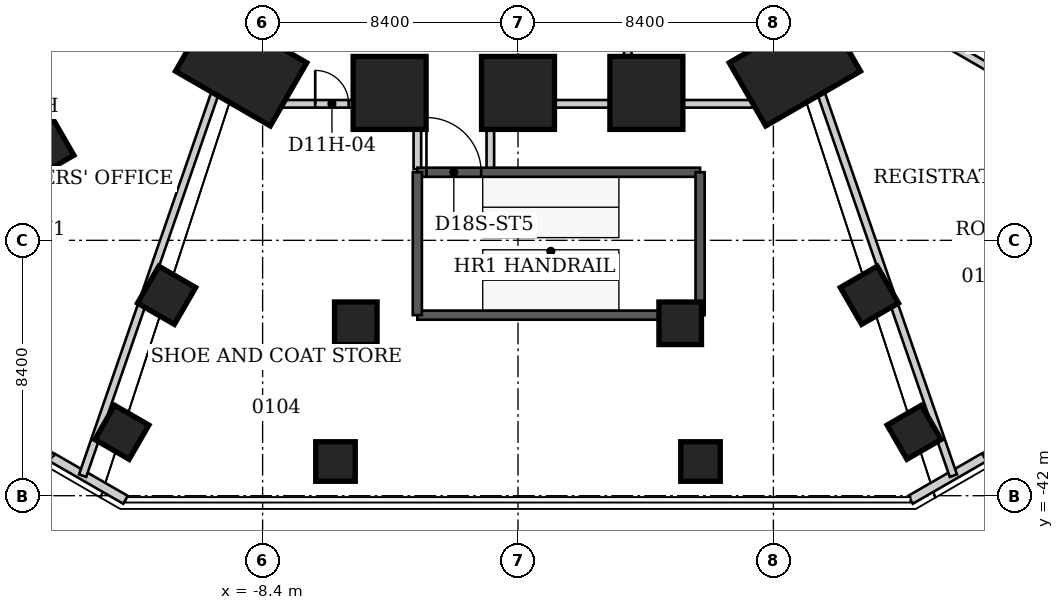
"""IFC4 building model, lengths in metres.
Left out: names, types, materials, properties, quantities, classifications, styles, units other than length and angle.
Written with IfcOpenShell. Run it as: python <this file> out.ifc"""

import sys

from ifc_helpers import new_model, si_unit, direction, frame, frame_2d, origin, origin_2d, place, context, subcontext, project, spatial, rectangle, extrude, element, fill, save


model = new_model("IFC4")
c1 = context("Model", 3, precision=1e-05, world=origin(), true_north=direction((0.0, 1.0)))
c2 = subcontext(c1, "Body", "Model", "MODEL_VIEW")
j1 = project(units=[si_unit("LENGTHUNIT", "METRE"), si_unit("PLANEANGLEUNIT", "RADIAN")], contexts=[c1])
p1 = place(None, origin())
s1 = spatial("IfcSite", under=j1, at=p1, CompositionType="ELEMENT")
p2 = place(p1, origin())
s2 = spatial("IfcBuilding", under=s1, at=p2, CompositionType="ELEMENT")
p3 = place(p2, frame((0.0, 0.0, 6.0)))
s3 = spatial("IfcBuildingStorey", under=s2, at=p3, CompositionType="ELEMENT", Elevation=6.0)
p4 = place(p3, frame((9.106, -27.897, 0.0), z_axis=(0.0, 0.0, 1.0), x_axis=(0.5, -0.866025403784, 0.0)))
e1 = element("IfcColumn", 1, at=p4, inside=s3, PredefinedType="COLUMN", context=c2, shape_type="SweptSolid", body=[
    extrude(rectangle(XDim=2.4, YDim=3.6, at=origin_2d()), origin(), (0.0, 0.0, 1.0), 6.0),
])
for number, where, z_axis, x_axis in (
    (2, (4.222, -28.751, 0.0), (0.0, 0.0, 1.0), (0.0, -1.0, 0.0)),
    (3, (0.0, -28.751, 0.0), (0.0, 0.0, 1.0), (0.0, -1.0, 0.0)),
    (4, (-4.222, -28.751, 0.0), (0.0, 0.0, 1.0), (0.0, -1.0, 0.0)),
):
    element("IfcColumn", number, at=place(p3, frame(where, z_axis=z_axis, x_axis=x_axis)), inside=s3, PredefinedType="COLUMN", context=c2, shape_type="SweptSolid", body=[
        extrude(rectangle(XDim=2.4, YDim=2.4, at=origin_2d()), origin(), (0.0, 0.0, 1.0), 6.0),
    ])
p5 = place(p3, frame((-9.106, -27.897, 0.0), z_axis=(0.0, 0.0, 1.0), x_axis=(-0.5, -0.866025403784, 0.0)))
e5 = element("IfcColumn", 5, at=p5, inside=s3, PredefinedType="COLUMN", context=c2, shape_type="SweptSolid", body=[
    extrude(rectangle(XDim=2.4, YDim=3.6, at=origin_2d()), origin(), (0.0, 0.0, 1.0), 6.0),
])
for number, where, z_axis, x_axis in (
    (6, (11.558, -35.408, 0.0), (0.0, 0.0, 1.0), (0.5, -0.866, 0.0)),
    (7, (5.335, -36.329, 0.0), (0.0, 0.0, 1.0), (0.0, -1.0, 0.0)),
    (8, (-5.335, -36.329, 0.0), (0.0, 0.0, 1.0), (0.0, -1.0, 0.0)),
    (9, (-11.558, -35.408, 0.0), (0.0, 0.0, 1.0), (-0.5, -0.866, 0.0)),
    (10, (-15.563, -30.546, 0.0), (0.0, 0.0, 1.0), (-0.866, -0.5, 0.0)),
):
    element("IfcColumn", number, at=place(p3, frame(where, z_axis=z_axis, x_axis=x_axis)), inside=s3, PredefinedType="COLUMN", context=c2, shape_type="SweptSolid", body=[
        extrude(rectangle(XDim=1.4, YDim=1.4, at=origin_2d()), origin(), (0.0, 0.0, 1.0), 6.0),
    ])
for number, where, z_axis, x_axis in (
    (11, (13.029, -39.915, 0.0), (0.0, 0.0, 1.0), (0.5, -0.866, 0.0)),
    (12, (6.003, -40.875, 0.0), (0.0, 0.0, 1.0), (0.0, -1.0, 0.0)),
    (13, (-6.003, -40.875, 0.0), (0.0, 0.0, 1.0), (0.0, -1.0, 0.0)),
    (14, (-13.029, -39.915, 0.0), (0.0, 0.0, 1.0), (-0.5, -0.866, 0.0)),
):
    element("IfcColumn", number, at=place(p3, frame(where, z_axis=z_axis, x_axis=x_axis)), inside=s3, PredefinedType="COLUMN", context=c2, shape_type="SweptSolid", body=[
        extrude(rectangle(XDim=1.3, YDim=1.3, at=origin_2d()), origin(), (0.0, 0.0, 1.0), 6.0),
    ])
for number, where, z_axis, x_axis in (
    (15, (15.335, -40.735, 0.0), (0.0, 0.0, 1.0), (-0.866, -0.5, 0.0)),
    (16, (-12.91, -42.135, 0.0), (0.0, 0.0, 1.0), (-0.866, 0.5, 0.0)),
):
    element("IfcWall", number, at=place(p3, frame(where, z_axis=z_axis, x_axis=x_axis)), inside=s3, PredefinedType="SOLIDWALL", context=c2, shape_type="SweptSolid", body=[
        extrude(rectangle(XDim=2.8, YDim=0.3, at=frame_2d((1.4, 0.0))), origin(), (0.0, 0.0, 1.0), 5.84),
    ])
p6 = place(p3, frame((-21.234, -30.465, 0.0), z_axis=(0.0, 0.0, 1.0), x_axis=(0.866022886878, 0.500004359385, 0.0)))
e17 = element("IfcWall", 17, at=p6, inside=s3, PredefinedType="PARTITIONING", context=c2, shape_type="SweptSolid", body=[
    extrude(rectangle(XDim=10.57, YDim=0.25, at=frame_2d((5.285, 0.0))), origin(), (0.0, 0.0, 1.0), 5.75),
])
p7 = place(p6, frame((4.485, 0.0, 0.0)))
e18 = element("IfcOpeningElement", 18, at=p7, cuts=e17, PredefinedType="OPENING", context=c2, shape_type="SweptSolid", body=[
    extrude(rectangle(XDim=1.6, YDim=2.4, at=frame_2d((0.8, 1.2))), frame((0.0, 0.125, 0.0), z_axis=(0.0, -1.0, 0.0), x_axis=(1.0, 0.0, 0.0)), (0.0, 0.0, 1.0), 0.25),
])
p8 = place(p3, frame((-14.32, -41.342, 0.0), z_axis=(0.0, 0.0, 1.0), x_axis=(0.326937002365, 0.94504613458, 0.0)))
e19 = element("IfcWall", 19, at=p8, inside=s3, PredefinedType="PARTITIONING", context=c2, shape_type="SweptSolid", body=[
    extrude(rectangle(XDim=13.673, YDim=0.25, at=frame_2d((6.836, 0.0))), origin(), (0.0, 0.0, 1.0), 5.75),
])
p9 = place(p3, frame((-10.38, -28.11, 0.0), z_axis=(0.0, 0.0, 1.0), x_axis=(-0.500502105275, 0.86573531903, 0.0)))
e20 = element("IfcWall", 20, at=p9, inside=s3, PredefinedType="PARTITIONING", context=c2, shape_type="SweptSolid", body=[
    extrude(rectangle(XDim=3.388, YDim=0.25, at=frame_2d((1.694, 0.0))), origin(), (0.0, 0.0, 1.0), 5.84),
])
p10 = place(p3, frame((-10.38, -28.11, 0.0), z_axis=(0.0, 0.0, 1.0), x_axis=(0.865714845822, -0.5005375168, 0.0)))
e21 = element("IfcWall", 21, at=p10, inside=s3, PredefinedType="PARTITIONING", context=c2, shape_type="SweptSolid", body=[
    extrude(rectangle(XDim=0.579, YDim=0.25, at=frame_2d((0.29, 0.0))), origin(), (0.0, 0.0, 1.0), 5.84),
])
p11 = place(p3, frame((-8.65, -29.11, 0.0), z_axis=(0.0, 0.0, 1.0), x_axis=(-0.866883441829, 0.498510880807, 0.0)))
e22 = element("IfcWall", 22, at=p11, inside=s3, PredefinedType="PARTITIONING", context=c2, shape_type="SweptSolid", body=[
    extrude(rectangle(XDim=1.385, YDim=0.25, at=frame_2d((0.692, 0.0))), origin(), (0.0, 0.0, 1.0), 5.84),
])
p12 = place(p3, frame((-8.65, -29.11, 0.0), z_axis=(0.0, 0.0, 1.0), x_axis=(1.0, 0.0, 0.0)))
e23 = element("IfcWall", 23, at=p12, inside=s3, PredefinedType="PARTITIONING", context=c2, shape_type="SweptSolid", body=[
    extrude(rectangle(XDim=0.82, YDim=0.25, at=frame_2d((0.41, 0.0))), origin(), (0.0, 0.0, 1.0), 5.84),
])
p13 = place(p3, frame((-7.83, -29.11, 0.0), z_axis=(0.0, 0.0, 1.0), x_axis=(0.0, 1.0, 0.0)))
e24 = element("IfcWall", 24, at=p13, inside=s3, PredefinedType="PARTITIONING", context=c2, shape_type="SweptSolid", body=[
    extrude(rectangle(XDim=2.4, YDim=0.25, at=frame_2d((1.2, 0.0))), origin(), (0.0, 0.0, 1.0), 5.84),
])
p14 = place(p3, frame((-7.83, -29.11, 0.0), z_axis=(0.0, 0.0, 1.0), x_axis=(1.0, 0.0, 0.0)))
e25 = element("IfcWall", 25, at=p14, inside=s3, PredefinedType="PARTITIONING", context=c2, shape_type="SweptSolid", body=[
    extrude(rectangle(XDim=4.52, YDim=0.25, at=frame_2d((2.26, 0.0))), origin(), (0.0, 0.0, 1.0), 4.04),
])
p15 = place(p14, frame((1.16, 0.0, 0.0)))
e26 = element("IfcOpeningElement", 26, at=p15, cuts=e25, PredefinedType="OPENING", context=c2, shape_type="SweptSolid", body=[
    extrude(rectangle(XDim=1.1, YDim=2.2, at=frame_2d((0.55, 1.1))), frame((0.0, 0.125, 0.0), z_axis=(0.0, -1.0, 0.0), x_axis=(1.0, 0.0, 0.0)), (0.0, 0.0, 1.0), 0.25),
])
for number, where, z_axis, x_axis in (
    (27, (-3.31, -29.11, 0.0), (0.0, 0.0, 1.0), (0.0, -1.0, 0.0)),
    (28, (-0.91, -31.26, 0.0), (0.0, 0.0, 1.0), (0.0, 1.0, 0.0)),
):
    element("IfcWall", number, at=place(p3, frame(where, z_axis=z_axis, x_axis=x_axis)), inside=s3, PredefinedType="PARTITIONING", context=c2, shape_type="SweptSolid", body=[
        extrude(rectangle(XDim=2.15, YDim=0.25, at=frame_2d((1.075, 0.0))), origin(), (0.0, 0.0, 1.0), 5.84),
    ])
p16 = place(p3, frame((-0.91, -29.11, 0.0), z_axis=(0.0, 0.0, 1.0), x_axis=(1.0, 0.0, 0.0)))
e29 = element("IfcWall", 29, at=p16, inside=s3, PredefinedType="PARTITIONING", context=c2, shape_type="SweptSolid", body=[
    extrude(rectangle(XDim=4.52, YDim=0.25, at=frame_2d((2.26, 0.0))), origin(), (0.0, 0.0, 1.0), 4.04),
])
p17 = place(p3, frame((3.61, -29.11, 0.0), z_axis=(0.0, 0.0, 1.0), x_axis=(1.0, 0.0, 0.0)))
e30 = element("IfcWall", 30, at=p17, inside=s3, PredefinedType="PARTITIONING", context=c2, shape_type="SweptSolid", body=[
    extrude(rectangle(XDim=5.04, YDim=0.25, at=frame_2d((2.52, 0.0))), origin(), (0.0, 0.0, 1.0), 4.04),
])
p18 = place(p3, frame((3.61, -26.71, 0.0), z_axis=(0.0, 0.0, 1.0), x_axis=(0.0, -1.0, 0.0)))
e31 = element("IfcWall", 31, at=p18, inside=s3, PredefinedType="PARTITIONING", context=c2, shape_type="SweptSolid", body=[
    extrude(rectangle(XDim=2.4, YDim=0.25, at=frame_2d((1.2, 0.0))), origin(), (0.0, 0.0, 1.0), 5.84),
])
p19 = place(p3, frame((8.65, -29.11, 0.0), z_axis=(0.0, 0.0, 1.0), x_axis=(0.865736025111, 0.500500883941, 0.0)))
e32 = element("IfcWall", 32, at=p19, inside=s3, PredefinedType="PARTITIONING", context=c2, shape_type="SweptSolid", body=[
    extrude(rectangle(XDim=1.384, YDim=0.25, at=frame_2d((0.692, 0.0))), origin(), (0.0, 0.0, 1.0), 5.84),
])
p20 = place(p3, frame((8.69, -26.21, 0.0), z_axis=(0.0, 0.0, 1.0), x_axis=(0.865442434468, -0.5010083758, 0.0)))
e33 = element("IfcWall", 33, at=p20, inside=s3, PredefinedType="PARTITIONING", context=c2, shape_type="SweptSolid", body=[
    extrude(rectangle(XDim=2.415, YDim=0.25, at=frame_2d((1.208, 0.0))), origin(), (0.0, 0.0, 1.0), 5.84),
])
p21 = place(p3, frame((9.85, -28.42, 0.0), z_axis=(0.0, 0.0, 1.0), x_axis=(0.326921055124, -0.945051651349, 0.0)))
e34 = element("IfcWall", 34, at=p21, inside=s3, PredefinedType="PARTITIONING", context=c2, shape_type="SweptSolid", body=[
    extrude(rectangle(XDim=13.673, YDim=0.25, at=frame_2d((6.836, 0.0))), origin(), (0.0, 0.0, 1.0), 5.75),
])
p22 = place(p3, frame((10.38, -28.11, 0.0), z_axis=(0.0, 0.0, 1.0), x_axis=(-0.865714845822, -0.5005375168, 0.0)))
e35 = element("IfcWall", 35, at=p22, inside=s3, PredefinedType="PARTITIONING", context=c2, shape_type="SweptSolid", body=[
    extrude(rectangle(XDim=0.579, YDim=0.25, at=frame_2d((0.29, 0.0))), origin(), (0.0, 0.0, 1.0), 5.84),
])
p23 = place(p3, frame((10.78, -27.42, 0.0), z_axis=(0.0, 0.0, 1.0), x_axis=(0.504526221307, 0.863396370165, 0.0)))
e36 = element("IfcWall", 36, at=p23, inside=s3, PredefinedType="PARTITIONING", context=c2, shape_type="SweptSolid", body=[
    extrude(rectangle(XDim=1.923, YDim=0.25, at=frame_2d((0.961, 0.0))), origin(), (0.0, 0.0, 1.0), 5.84),
])
p24 = place(p3, frame((10.79, -27.42, 0.0), z_axis=(0.0, 0.0, 1.0), x_axis=(-0.510777713782, -0.859712816645, 0.0)))
e37 = element("IfcWall", 37, at=p24, inside=s3, PredefinedType="PARTITIONING", context=c2, shape_type="SweptSolid", body=[
    extrude(rectangle(XDim=0.802, YDim=0.25, at=frame_2d((0.401, 0.0))), origin(), (0.0, 0.0, 1.0), 5.84),
])
p25 = place(p3, frame((20.894, -31.045, 0.0), z_axis=(0.0, 0.0, 1.0), x_axis=(-0.865795861716, 0.500397367933, 0.0)))
e38 = element("IfcWall", 38, at=p25, inside=s3, PredefinedType="PARTITIONING", context=c2, shape_type="SweptSolid", body=[
    extrude(rectangle(XDim=10.562, YDim=0.25, at=frame_2d((5.281, 0.0))), origin(), (0.0, 0.0, 1.0), 5.75),
])
p26 = place(p25, frame((4.481, 0.0, 0.0)))
e39 = element("IfcOpeningElement", 39, at=p26, cuts=e38, PredefinedType="OPENING", context=c2, shape_type="SweptSolid", body=[
    extrude(rectangle(XDim=1.6, YDim=2.4, at=frame_2d((0.8, 1.2))), frame((0.0, 0.125, 0.0), z_axis=(0.0, -1.0, 0.0), x_axis=(1.0, 0.0, 0.0)), (0.0, 0.0, 1.0), 0.25),
])
p27 = place(p3, frame((-3.311, -31.361, 0.0), z_axis=(0.0, 0.0, 1.0), x_axis=(1.0, 0.0, 0.0)))
e40 = element("IfcWall", 40, at=p27, inside=s3, PredefinedType="SHEAR", context=c2, shape_type="SweptSolid", body=[
    extrude(rectangle(XDim=9.3, YDim=0.3, at=frame_2d((4.65, 0.0))), origin(), (0.0, 0.0, 1.0), 6.0),
])
p28 = place(p27, frame((0.3, 0.0, 0.0)))
e41 = element("IfcOpeningElement", 41, at=p28, cuts=e40, PredefinedType="OPENING", context=c2, shape_type="SweptSolid", body=[
    extrude(rectangle(XDim=1.8, YDim=2.4, at=frame_2d((0.9, 1.2))), frame((0.0, 0.15, 0.0), z_axis=(0.0, -1.0, 0.0), x_axis=(1.0, 0.0, 0.0)), (0.0, 0.0, 1.0), 0.3),
])
p29 = place(p3, frame((5.989, -31.361, 0.0), z_axis=(0.0, 0.0, 1.0), x_axis=(0.0, -1.0, 0.0)))
e42 = element("IfcWall", 42, at=p29, inside=s3, PredefinedType="SHEAR", context=c2, shape_type="SweptSolid", body=[
    extrude(rectangle(XDim=4.7, YDim=0.3, at=frame_2d((2.35, 0.0))), origin(), (0.0, 0.0, 1.0), 6.0),
])
p30 = place(p3, frame((5.989, -36.061, 0.0), z_axis=(0.0, 0.0, 1.0), x_axis=(-1.0, 0.0, 0.0)))
e43 = element("IfcWall", 43, at=p30, inside=s3, PredefinedType="SHEAR", context=c2, shape_type="SweptSolid", body=[
    extrude(rectangle(XDim=9.3, YDim=0.3, at=frame_2d((4.65, 0.0))), origin(), (0.0, 0.0, 1.0), 6.0),
])
p31 = place(p3, frame((-3.311, -36.061, 0.0), z_axis=(0.0, 0.0, 1.0), x_axis=(0.0, 1.0, 0.0)))
e44 = element("IfcWall", 44, at=p31, inside=s3, PredefinedType="SHEAR", context=c2, shape_type="SweptSolid", body=[
    extrude(rectangle(XDim=4.7, YDim=0.3, at=frame_2d((2.35, 0.0))), origin(), (0.0, 0.0, 1.0), 6.0),
])
p32 = place(p15, origin())
e45 = element("IfcDoor", 45, at=p32, inside=s3, OperationType="SINGLE_SWING_LEFT", PredefinedType="DOOR", context=c2, shape_type="SweptSolid", body=[
    extrude(rectangle(XDim=1.1, YDim=2.2, at=frame_2d((0.55, 1.1))), frame((0.0, 0.025, 0.0), z_axis=(0.0, -1.0, 0.0), x_axis=(1.0, 0.0, 0.0)), (0.0, 0.0, 1.0), 0.05),
])
fill(e26, e45)
p33 = place(p28, origin())
e46 = element("IfcDoor", 46, at=p33, inside=s3, OperationType="DOUBLE_DOOR_SINGLE_SWING", PredefinedType="DOOR", context=c2, shape_type="SweptSolid", body=[
    extrude(rectangle(XDim=1.8, YDim=2.4, at=frame_2d((0.9, 1.2))), frame((0.0, 0.025, 0.0), z_axis=(0.0, -1.0, 0.0), x_axis=(1.0, 0.0, 0.0)), (0.0, 0.0, 1.0), 0.05),
])
fill(e41, e46)
save(model, sys.argv[1])
